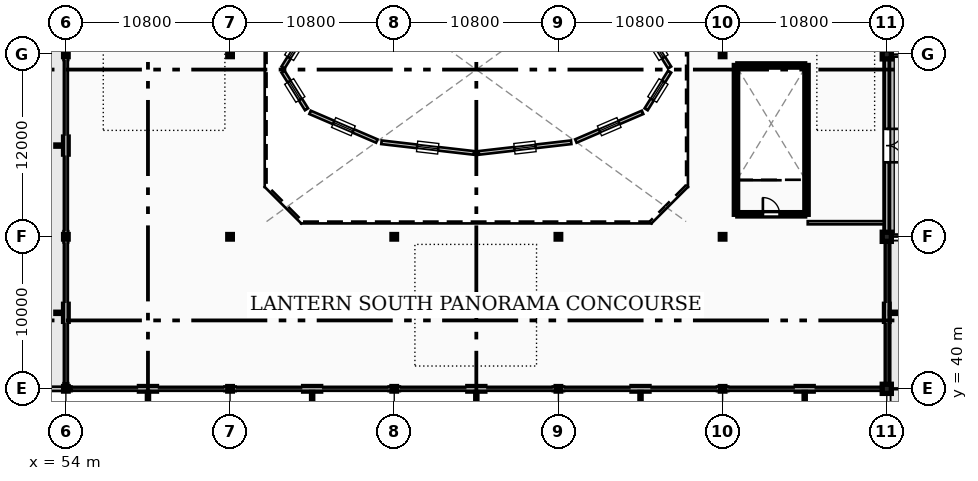
"""IFC4 building model, lengths in metres.
Left out: names, types, materials, properties, quantities, classifications, styles, units other than length and angle.
Written with IfcOpenShell. Run it as: python <this file> out.ifc"""

import sys

from ifc_helpers import new_model, si_unit, direction, frame, frame_2d, origin, origin_2d, place, context, subcontext, project, spatial, polyline, rectangle, hollow_rectangle, outline, extrude, element, fill, save


model = new_model("IFC4")
c1 = context("Model", 3, precision=1e-05, world=origin(), true_north=direction((0.0, 1.0)))
c2 = subcontext(c1, "Body", "Model", "MODEL_VIEW")
j1 = project(units=[si_unit("LENGTHUNIT", "METRE"), si_unit("PLANEANGLEUNIT", "RADIAN")], contexts=[c1])
p1 = place(None, origin())
s1 = spatial("IfcSite", under=j1, at=p1, CompositionType="ELEMENT")
p2 = place(p1, origin())
s2 = spatial("IfcBuilding", under=s1, at=p2, CompositionType="ELEMENT")
p3 = place(p2, frame((0.0, 0.0, 24.0)))
s3 = spatial("IfcBuildingStorey", under=s2, at=p3, CompositionType="ELEMENT", Elevation=24.0)
for number, where, z_axis, x_axis in (
    (1, (54.0, 40.0, 0.0), (0.0, 0.0, 1.0), (1.0, 0.0, 0.0)),
    (2, (54.0, 50.0, 0.0), (0.0, 0.0, 1.0), (1.0, 0.0, 0.0)),
    (3, (54.0, 62.0, 0.0), (0.0, 0.0, 1.0), (1.0, 0.0, 0.0)),
    (4, (64.8, 40.0, 0.0), (0.0, 0.0, 1.0), (1.0, 0.0, 0.0)),
    (5, (64.8, 50.0, 0.0), (0.0, 0.0, 1.0), (1.0, 0.0, 0.0)),
    (6, (64.8, 62.0, 0.0), (0.0, 0.0, 1.0), (1.0, 0.0, 0.0)),
    (7, (75.6, 40.0, 0.0), (0.0, 0.0, 1.0), (1.0, 0.0, 0.0)),
    (8, (75.6, 50.0, 0.0), (0.0, 0.0, 1.0), (1.0, 0.0, 0.0)),
    (9, (86.4, 40.0, 0.0), (0.0, 0.0, 1.0), (1.0, 0.0, 0.0)),
    (10, (86.4, 50.0, 0.0), (0.0, 0.0, 1.0), (1.0, 0.0, 0.0)),
    (11, (97.2, 40.0, 0.0), (0.0, 0.0, 1.0), (1.0, 0.0, 0.0)),
    (12, (97.2, 50.0, 0.0), (0.0, 0.0, 1.0), (1.0, 0.0, 0.0)),
    (13, (97.2, 62.0, 0.0), (0.0, 0.0, 1.0), (1.0, 0.0, 0.0)),
):
    element("IfcColumn", number, at=place(p3, frame(where, z_axis=z_axis, x_axis=x_axis)), inside=s3, PredefinedType="COLUMN", context=c2, shape_type="SweptSolid", body=[
        extrude(hollow_rectangle(XDim=0.3, YDim=0.3, WallThickness=0.016, InnerFilletRadius=0.016, OuterFilletRadius=0.032, at=origin_2d()), origin(), (0.0, 0.0, 1.0), 4.8),
    ])
for number, where, z_axis, x_axis in (
    (14, (108.0, 40.0, 0.0), (0.0, 0.0, 1.0), (1.0, 0.0, 0.0)),
    (15, (108.0, 50.0, 0.0), (0.0, 0.0, 1.0), (1.0, 0.0, 0.0)),
    (16, (108.0, 62.0, 0.0), (0.0, 0.0, 1.0), (1.0, 0.0, 0.0)),
):
    element("IfcColumn", number, at=place(p3, frame(where, z_axis=z_axis, x_axis=x_axis)), inside=s3, PredefinedType="COLUMN", context=c2, shape_type="SweptSolid", body=[
        extrude(rectangle(XDim=0.6, YDim=0.6, at=origin_2d()), origin(), (0.0, 0.0, 1.0), 4.8),
    ])
p4 = place(p3, frame((54.0, 56.65, 0.0), z_axis=(0.0, 0.0, 1.0), x_axis=(0.0, -1.0, 0.0)))
e17 = element("IfcWall", 17, at=p4, inside=s3, PredefinedType="STANDARD", context=c2, shape_type="SweptSolid", body=[
    extrude(rectangle(XDim=1.3, YDim=0.48, at=frame_2d((0.65, 0.0))), origin(), (0.0, 0.0, 1.0), 4.109),
])
for number, where, z_axis, x_axis in (
    (18, (54.0, 61.855, 0.0), (0.0, 0.0, 1.0), (0.0, -1.0, 0.0)),
    (19, (54.0, 50.37, 0.0), (0.0, 0.0, 1.0), (0.0, -1.0, 0.0)),
):
    element("IfcWall", number, at=place(p3, frame(where, z_axis=z_axis, x_axis=x_axis)), inside=s3, PredefinedType="STANDARD", context=c2, shape_type="SweptSolid", body=[
        extrude(rectangle(XDim=0.225, YDim=0.3, at=frame_2d((0.113, 0.0))), origin(), (0.0, 0.0, 1.0), 4.56),
    ])
p5 = place(p3, frame((54.0, 45.65, 0.0), z_axis=(0.0, 0.0, 1.0), x_axis=(0.0, -1.0, 0.0)))
e20 = element("IfcWall", 20, at=p5, inside=s3, PredefinedType="STANDARD", context=c2, shape_type="SweptSolid", body=[
    extrude(rectangle(XDim=1.3, YDim=0.48, at=frame_2d((0.65, 0.0))), origin(), (0.0, 0.0, 1.0), 4.109),
])
for number, where, z_axis, x_axis in (
    (21, (54.0, 49.855, 0.0), (0.0, 0.0, 1.0), (0.0, -1.0, 0.0)),
    (22, (54.0, 40.37, 0.0), (0.0, 0.0, 1.0), (0.0, -1.0, 0.0)),
):
    element("IfcWall", number, at=place(p3, frame(where, z_axis=z_axis, x_axis=x_axis)), inside=s3, PredefinedType="STANDARD", context=c2, shape_type="SweptSolid", body=[
        extrude(rectangle(XDim=0.225, YDim=0.3, at=frame_2d((0.113, 0.0))), origin(), (0.0, 0.0, 1.0), 4.56),
    ])
p6 = place(p3, frame((58.75, 40.0, 0.0), z_axis=(0.0, 0.0, 1.0), x_axis=(1.0, 0.0, 0.0)))
e23 = element("IfcWall", 23, at=p6, inside=s3, PredefinedType="STANDARD", context=c2, shape_type="SweptSolid", body=[
    extrude(rectangle(XDim=1.3, YDim=0.48, at=frame_2d((0.65, 0.0))), origin(), (0.0, 0.0, 1.0), 4.109),
])
for number, where, z_axis, x_axis in (
    (24, (54.145, 40.0, 0.0), (0.0, 0.0, 1.0), (1.0, 0.0, 0.0)),
    (25, (64.43, 40.0, 0.0), (0.0, 0.0, 1.0), (1.0, 0.0, 0.0)),
):
    element("IfcWall", number, at=place(p3, frame(where, z_axis=z_axis, x_axis=x_axis)), inside=s3, PredefinedType="STANDARD", context=c2, shape_type="SweptSolid", body=[
        extrude(rectangle(XDim=0.225, YDim=0.3, at=frame_2d((0.113, 0.0))), origin(), (0.0, 0.0, 1.0), 4.56),
    ])
p7 = place(p3, frame((69.55, 40.0, 0.0), z_axis=(0.0, 0.0, 1.0), x_axis=(1.0, 0.0, 0.0)))
e26 = element("IfcWall", 26, at=p7, inside=s3, PredefinedType="STANDARD", context=c2, shape_type="SweptSolid", body=[
    extrude(rectangle(XDim=1.3, YDim=0.48, at=frame_2d((0.65, 0.0))), origin(), (0.0, 0.0, 1.0), 4.109),
])
p8 = place(p3, frame((64.945, 40.0, 0.0), z_axis=(0.0, 0.0, 1.0), x_axis=(1.0, 0.0, 0.0)))
e27 = element("IfcWall", 27, at=p8, inside=s3, PredefinedType="STANDARD", context=c2, shape_type="SweptSolid", body=[
    extrude(rectangle(XDim=0.225, YDim=0.3, at=frame_2d((0.112, 0.0))), origin(), (0.0, 0.0, 1.0), 4.56),
])
p9 = place(p3, frame((75.23, 40.0, 0.0), z_axis=(0.0, 0.0, 1.0), x_axis=(1.0, 0.0, 0.0)))
e28 = element("IfcWall", 28, at=p9, inside=s3, PredefinedType="STANDARD", context=c2, shape_type="SweptSolid", body=[
    extrude(rectangle(XDim=0.225, YDim=0.3, at=frame_2d((0.113, 0.0))), origin(), (0.0, 0.0, 1.0), 4.56),
])
p10 = place(p3, frame((80.35, 40.0, 0.0), z_axis=(0.0, 0.0, 1.0), x_axis=(1.0, 0.0, 0.0)))
e29 = element("IfcWall", 29, at=p10, inside=s3, PredefinedType="STANDARD", context=c2, shape_type="SweptSolid", body=[
    extrude(rectangle(XDim=1.3, YDim=0.48, at=frame_2d((0.65, 0.0))), origin(), (0.0, 0.0, 1.0), 4.109),
])
for number, where, z_axis, x_axis in (
    (30, (75.745, 40.0, 0.0), (0.0, 0.0, 1.0), (1.0, 0.0, 0.0)),
    (31, (86.03, 40.0, 0.0), (0.0, 0.0, 1.0), (1.0, 0.0, 0.0)),
):
    element("IfcWall", number, at=place(p3, frame(where, z_axis=z_axis, x_axis=x_axis)), inside=s3, PredefinedType="STANDARD", context=c2, shape_type="SweptSolid", body=[
        extrude(rectangle(XDim=0.225, YDim=0.3, at=frame_2d((0.112, 0.0))), origin(), (0.0, 0.0, 1.0), 4.56),
    ])
p11 = place(p3, frame((91.15, 40.0, 0.0), z_axis=(0.0, 0.0, 1.0), x_axis=(1.0, 0.0, 0.0)))
e32 = element("IfcWall", 32, at=p11, inside=s3, PredefinedType="STANDARD", context=c2, shape_type="SweptSolid", body=[
    extrude(rectangle(XDim=1.3, YDim=0.48, at=frame_2d((0.65, 0.0))), origin(), (0.0, 0.0, 1.0), 4.109),
])
p12 = place(p3, frame((86.545, 40.0, 0.0), z_axis=(0.0, 0.0, 1.0), x_axis=(1.0, 0.0, 0.0)))
e33 = element("IfcWall", 33, at=p12, inside=s3, PredefinedType="STANDARD", context=c2, shape_type="SweptSolid", body=[
    extrude(rectangle(XDim=0.225, YDim=0.3, at=frame_2d((0.113, 0.0))), origin(), (0.0, 0.0, 1.0), 4.56),
])
p13 = place(p3, frame((96.83, 40.0, 0.0), z_axis=(0.0, 0.0, 1.0), x_axis=(1.0, 0.0, 0.0)))
e34 = element("IfcWall", 34, at=p13, inside=s3, PredefinedType="STANDARD", context=c2, shape_type="SweptSolid", body=[
    extrude(rectangle(XDim=0.225, YDim=0.3, at=frame_2d((0.112, 0.0))), origin(), (0.0, 0.0, 1.0), 4.56),
])
p14 = place(p3, frame((101.95, 40.0, 0.0), z_axis=(0.0, 0.0, 1.0), x_axis=(1.0, 0.0, 0.0)))
e35 = element("IfcWall", 35, at=p14, inside=s3, PredefinedType="STANDARD", context=c2, shape_type="SweptSolid", body=[
    extrude(rectangle(XDim=1.3, YDim=0.48, at=frame_2d((0.65, 0.0))), origin(), (0.0, 0.0, 1.0), 4.109),
])
for number, where, z_axis, x_axis in (
    (36, (97.345, 40.0, 0.0), (0.0, 0.0, 1.0), (1.0, 0.0, 0.0)),
    (37, (107.63, 40.0, 0.0), (0.0, 0.0, 1.0), (1.0, 0.0, 0.0)),
):
    element("IfcWall", number, at=place(p3, frame(where, z_axis=z_axis, x_axis=x_axis)), inside=s3, PredefinedType="STANDARD", context=c2, shape_type="SweptSolid", body=[
        extrude(rectangle(XDim=0.225, YDim=0.3, at=frame_2d((0.113, 0.0))), origin(), (0.0, 0.0, 1.0), 4.56),
    ])
p15 = place(p3, frame((108.0, 44.35, 0.0), z_axis=(0.0, 0.0, 1.0), x_axis=(0.0, 1.0, 0.0)))
e38 = element("IfcWall", 38, at=p15, inside=s3, PredefinedType="STANDARD", context=c2, shape_type="SweptSolid", body=[
    extrude(rectangle(XDim=1.3, YDim=0.48, at=frame_2d((0.65, 0.0))), origin(), (0.0, 0.0, 1.0), 4.109),
])
for number, where, z_axis, x_axis in (
    (39, (108.0, 40.145, 0.0), (0.0, 0.0, 1.0), (0.0, 1.0, 0.0)),
    (40, (108.0, 49.63, 0.0), (0.0, 0.0, 1.0), (0.0, 1.0, 0.0)),
):
    element("IfcWall", number, at=place(p3, frame(where, z_axis=z_axis, x_axis=x_axis)), inside=s3, PredefinedType="STANDARD", context=c2, shape_type="SweptSolid", body=[
        extrude(rectangle(XDim=0.225, YDim=0.3, at=frame_2d((0.113, 0.0))), origin(), (0.0, 0.0, 1.0), 4.56),
    ])
p16 = place(p3, frame((108.0, 50.145, 0.0), z_axis=(0.0, 0.0, 1.0), x_axis=(0.0, 1.0, 0.0)))
e41 = element("IfcWall", 41, at=p16, inside=s3, PredefinedType="STANDARD", context=c2, shape_type="SweptSolid", body=[
    extrude(rectangle(XDim=11.71, YDim=0.42, at=frame_2d((5.855, 0.0))), origin(), (0.0, 0.0, 1.0), 4.109),
])
p17 = place(p16, frame((4.755, 0.0, 0.0)))
e42 = element("IfcOpeningElement", 42, at=p17, cuts=e41, PredefinedType="OPENING", context=c2, shape_type="SweptSolid", body=[
    extrude(rectangle(XDim=2.2, YDim=2.4, at=frame_2d((1.1, 1.2))), frame((0.0, 0.22, 0.0), z_axis=(0.0, -1.0, 0.0), x_axis=(1.0, 0.0, 0.0)), (0.0, 0.0, 1.0), 0.44),
])
p18 = place(p3, frame((54.35, 40.0, 4.6), z_axis=(0.0, 0.0, 1.0), x_axis=(1.0, 0.0, 0.0)))
e43 = element("IfcWall", 43, at=p18, inside=s3, PredefinedType="PARAPET", context=c2, shape_type="SweptSolid", body=[
    extrude(rectangle(XDim=53.3, YDim=0.26, at=frame_2d((26.65, 0.0))), origin(), (0.0, 0.0, 1.0), 0.55),
])
for number, where, z_axis, x_axis in (
    (44, (54.0, 40.35, 4.6), (0.0, 0.0, 1.0), (0.0, 1.0, 0.0)),
    (45, (108.0, 40.35, 4.6), (0.0, 0.0, 1.0), (0.0, 1.0, 0.0)),
):
    element("IfcWall", number, at=place(p3, frame(where, z_axis=z_axis, x_axis=x_axis)), inside=s3, PredefinedType="PARAPET", context=c2, shape_type="SweptSolid", body=[
        extrude(rectangle(XDim=41.3, YDim=0.26, at=frame_2d((20.65, 0.0))), origin(), (0.0, 0.0, 1.0), 0.55),
    ])
p19 = place(p3, frame((93.715, 61.136, 7.84), z_axis=(0.0, 0.0, 1.0), x_axis=(-0.52909704263, 0.848561323347, 0.0)))
e46 = element("IfcWall", 46, at=p19, inside=s3, PredefinedType="STANDARD", context=c2, shape_type="SweptSolid", body=[
    extrude(rectangle(XDim=2.921, YDim=0.24, at=frame_2d((1.46, 0.0))), origin(), (0.0, 0.0, 1.0), 2.16),
])
p20 = place(p19, frame((0.76, 0.0, 0.3)))
e47 = element("IfcOpeningElement", 47, at=p20, cuts=e46, PredefinedType="OPENING", context=c2, shape_type="SweptSolid", body=[
    extrude(rectangle(XDim=1.4, YDim=1.4, at=frame_2d((0.7, 0.7))), frame((0.0, 0.13, 0.0), z_axis=(0.0, -1.0, 0.0), x_axis=(1.0, 0.0, 0.0)), (0.0, 0.0, 1.0), 0.26),
])
p21 = place(p3, frame((69.83, 63.614, 7.84), z_axis=(0.0, 0.0, 1.0), x_axis=(-0.52909704263, -0.848561323347, 0.0)))
e48 = element("IfcWall", 48, at=p21, inside=s3, PredefinedType="STANDARD", context=c2, shape_type="SweptSolid", body=[
    extrude(rectangle(XDim=2.921, YDim=0.24, at=frame_2d((1.46, 0.0))), origin(), (0.0, 0.0, 1.0), 2.16),
])
p22 = place(p21, frame((0.76, 0.0, 0.3)))
e49 = element("IfcOpeningElement", 49, at=p22, cuts=e48, PredefinedType="OPENING", context=c2, shape_type="SweptSolid", body=[
    extrude(rectangle(XDim=1.4, YDim=1.4, at=frame_2d((0.7, 0.7))), frame((0.0, 0.13, 0.0), z_axis=(0.0, -1.0, 0.0), x_axis=(1.0, 0.0, 0.0)), (0.0, 0.0, 1.0), 0.26),
])
p23 = place(p3, frame((68.285, 60.864, 7.84), z_axis=(0.0, 0.0, 1.0), x_axis=(0.52909704263, -0.848561323347, 0.0)))
e50 = element("IfcWall", 50, at=p23, inside=s3, PredefinedType="STANDARD", context=c2, shape_type="SweptSolid", body=[
    extrude(rectangle(XDim=2.921, YDim=0.24, at=frame_2d((1.46, 0.0))), origin(), (0.0, 0.0, 1.0), 2.16),
])
p24 = place(p23, frame((0.76, 0.0, 0.3)))
e51 = element("IfcOpeningElement", 51, at=p24, cuts=e50, PredefinedType="OPENING", context=c2, shape_type="SweptSolid", body=[
    extrude(rectangle(XDim=1.4, YDim=1.4, at=frame_2d((0.7, 0.7))), frame((0.0, 0.13, 0.0), z_axis=(0.0, -1.0, 0.0), x_axis=(1.0, 0.0, 0.0)), (0.0, 0.0, 1.0), 0.26),
])
p25 = place(p3, frame((70.062, 58.187, 7.84), z_axis=(0.0, 0.0, 1.0), x_axis=(0.918772047343, -0.394788456039, 0.0)))
e52 = element("IfcWall", 52, at=p25, inside=s3, PredefinedType="STANDARD", context=c2, shape_type="SweptSolid", body=[
    extrude(rectangle(XDim=4.779, YDim=0.24, at=frame_2d((2.39, 0.0))), origin(), (0.0, 0.0, 1.0), 2.16),
])
p26 = place(p25, frame((1.69, 0.0, 0.3)))
e53 = element("IfcOpeningElement", 53, at=p26, cuts=e52, PredefinedType="OPENING", context=c2, shape_type="SweptSolid", body=[
    extrude(rectangle(XDim=1.4, YDim=1.4, at=frame_2d((0.7, 0.7))), frame((0.0, 0.13, 0.0), z_axis=(0.0, -1.0, 0.0), x_axis=(1.0, 0.0, 0.0)), (0.0, 0.0, 1.0), 0.26),
])
p27 = place(p3, frame((74.759, 56.219, 7.84), z_axis=(0.0, 0.0, 1.0), x_axis=(0.993438765736, -0.114365286402, 0.0)))
e54 = element("IfcWall", 54, at=p27, inside=s3, PredefinedType="STANDARD", context=c2, shape_type="SweptSolid", body=[
    extrude(rectangle(XDim=6.123, YDim=0.24, at=frame_2d((3.061, 0.0))), origin(), (0.0, 0.0, 1.0), 2.16),
])
p28 = place(p27, frame((2.361, 0.0, 0.3)))
e55 = element("IfcOpeningElement", 55, at=p28, cuts=e54, PredefinedType="OPENING", context=c2, shape_type="SweptSolid", body=[
    extrude(rectangle(XDim=1.4, YDim=1.4, at=frame_2d((0.7, 0.7))), frame((0.0, 0.13, 0.0), z_axis=(0.0, -1.0, 0.0), x_axis=(1.0, 0.0, 0.0)), (0.0, 0.0, 1.0), 0.26),
])
p29 = place(p3, frame((81.159, 55.518, 7.84), z_axis=(0.0, 0.0, 1.0), x_axis=(0.993438765736, 0.114365286402, 0.0)))
e56 = element("IfcWall", 56, at=p29, inside=s3, PredefinedType="STANDARD", context=c2, shape_type="SweptSolid", body=[
    extrude(rectangle(XDim=6.123, YDim=0.24, at=frame_2d((3.061, 0.0))), origin(), (0.0, 0.0, 1.0), 2.16),
])
p30 = place(p29, frame((2.361, 0.0, 0.3)))
e57 = element("IfcOpeningElement", 57, at=p30, cuts=e56, PredefinedType="OPENING", context=c2, shape_type="SweptSolid", body=[
    extrude(rectangle(XDim=1.4, YDim=1.4, at=frame_2d((0.7, 0.7))), frame((0.0, 0.13, 0.0), z_axis=(0.0, -1.0, 0.0), x_axis=(1.0, 0.0, 0.0)), (0.0, 0.0, 1.0), 0.26),
])
p31 = place(p3, frame((87.547, 56.3, 7.84), z_axis=(0.0, 0.0, 1.0), x_axis=(0.918772047343, 0.394788456039, 0.0)))
e58 = element("IfcWall", 58, at=p31, inside=s3, PredefinedType="STANDARD", context=c2, shape_type="SweptSolid", body=[
    extrude(rectangle(XDim=4.779, YDim=0.24, at=frame_2d((2.39, 0.0))), origin(), (0.0, 0.0, 1.0), 2.16),
])
p32 = place(p31, frame((1.69, 0.0, 0.3)))
e59 = element("IfcOpeningElement", 59, at=p32, cuts=e58, PredefinedType="OPENING", context=c2, shape_type="SweptSolid", body=[
    extrude(rectangle(XDim=1.4, YDim=1.4, at=frame_2d((0.7, 0.7))), frame((0.0, 0.13, 0.0), z_axis=(0.0, -1.0, 0.0), x_axis=(1.0, 0.0, 0.0)), (0.0, 0.0, 1.0), 0.26),
])
p33 = place(p3, frame((92.17, 58.386, 7.84), z_axis=(0.0, 0.0, 1.0), x_axis=(0.52909704263, 0.848561323347, 0.0)))
e60 = element("IfcWall", 60, at=p33, inside=s3, PredefinedType="STANDARD", context=c2, shape_type="SweptSolid", body=[
    extrude(rectangle(XDim=2.921, YDim=0.24, at=frame_2d((1.46, 0.0))), origin(), (0.0, 0.0, 1.0), 2.16),
])
p34 = place(p33, frame((0.76, 0.0, 0.3)))
e61 = element("IfcOpeningElement", 61, at=p34, cuts=e60, PredefinedType="OPENING", context=c2, shape_type="SweptSolid", body=[
    extrude(rectangle(XDim=1.4, YDim=1.4, at=frame_2d((0.7, 0.7))), frame((0.0, 0.13, 0.0), z_axis=(0.0, -1.0, 0.0), x_axis=(1.0, 0.0, 0.0)), (0.0, 0.0, 1.0), 0.26),
])
p35 = place(p3, frame((3.4, 40.0, -0.02), z_axis=(0.0, 0.0, 1.0), x_axis=(1.0, 0.0, 0.0)))
e62 = element("IfcWall", 62, at=p35, inside=s3, PredefinedType="STANDARD", context=c2, shape_type="SweptSolid", body=[
    extrude(outline(polyline([(0.0, 0.0), (50.45, 0.0), (50.45, 1.48), (0.0, 0.04), (0.0, 0.0)])), frame((0.0, 0.14, 0.0), z_axis=(0.0, -1.0, 0.0), x_axis=(1.0, 0.0, 0.0)), (0.0, 0.0, 1.0), 0.28),
])
for number, where, z_axis, x_axis in (
    (63, (98.08, 51.48, 0.0), (0.0, 0.0, 1.0), (0.0, 1.0, 0.0)),
    (64, (102.72, 51.48, 0.0), (0.0, 0.0, 1.0), (0.0, 1.0, 0.0)),
):
    element("IfcWall", number, at=place(p3, frame(where, z_axis=z_axis, x_axis=x_axis)), inside=s3, PredefinedType="SHEAR", context=c2, shape_type="SweptSolid", body=[
        extrude(rectangle(XDim=9.79, YDim=0.22, at=frame_2d((4.895, 0.0))), origin(), (0.0, 0.0, 1.0), 4.56),
    ])
p36 = place(p3, frame((98.2, 61.27, 0.0), z_axis=(0.0, 0.0, 1.0), x_axis=(1.0, 0.0, 0.0)))
e65 = element("IfcWall", 65, at=p36, inside=s3, PredefinedType="SHEAR", context=c2, shape_type="SweptSolid", body=[
    extrude(rectangle(XDim=4.4, YDim=0.22, at=frame_2d((2.2, 0.0))), origin(), (0.0, 0.0, 1.0), 4.56),
])
p37 = place(p3, frame((98.2, 51.48, 0.0), z_axis=(0.0, 0.0, 1.0), x_axis=(1.0, 0.0, 0.0)))
e66 = element("IfcWall", 66, at=p37, inside=s3, PredefinedType="SHEAR", context=c2, shape_type="SweptSolid", body=[
    extrude(rectangle(XDim=4.4, YDim=0.22, at=frame_2d((2.2, 0.0))), origin(), (0.0, 0.0, 1.0), 4.56),
])
p38 = place(p37, frame((1.65, 0.0, 0.0)))
e67 = element("IfcOpeningElement", 67, at=p38, cuts=e66, PredefinedType="OPENING", context=c2, shape_type="SweptSolid", body=[
    extrude(rectangle(XDim=1.1, YDim=2.2, at=frame_2d((0.55, 1.1))), frame((0.0, 0.12, 0.0), z_axis=(0.0, -1.0, 0.0), x_axis=(1.0, 0.0, 0.0)), (0.0, 0.0, 1.0), 0.24),
])
p39 = place(p3, frame((102.8, 50.925, 0.0), z_axis=(0.0, 0.0, 1.0), x_axis=(1.0, 0.0, 0.0)))
e68 = element("IfcWall", 68, at=p39, inside=s3, PredefinedType="PARTITIONING", context=c2, shape_type="SweptSolid", body=[
    extrude(rectangle(XDim=5.02, YDim=0.21, at=frame_2d((2.51, 0.0))), origin(), (0.0, 0.0, 1.0), 4.52),
])
p40 = place(p17, frame((2.2, 0.0, 0.0), z_axis=(0.0, 0.0, 1.0), x_axis=(-1.0, 0.0, 0.0)))
e69 = element("IfcDoor", 69, at=p40, inside=s3, OperationType="DOUBLE_DOOR_SINGLE_SWING", PredefinedType="DOOR", context=c2, shape_type="SweptSolid", body=[
    extrude(rectangle(XDim=2.2, YDim=2.4, at=frame_2d((1.1, 1.2))), frame((0.0, 0.025, 0.0), z_axis=(0.0, -1.0, 0.0), x_axis=(1.0, 0.0, 0.0)), (0.0, 0.0, 1.0), 0.05),
])
fill(e42, e69)
p41 = place(p20, origin())
e70 = element("IfcWindow", 70, at=p41, inside=s3, PartitioningType="SINGLE_PANEL", PredefinedType="WINDOW", context=c2, shape_type="SweptSolid", body=[
    extrude(rectangle(XDim=1.4, YDim=1.4, at=frame_2d((0.7, 0.7))), frame((0.0, 0.03, 0.0), z_axis=(0.0, -1.0, 0.0), x_axis=(1.0, 0.0, 0.0)), (0.0, 0.0, 1.0), 0.06),
])
fill(e47, e70)
p42 = place(p22, origin())
e71 = element("IfcWindow", 71, at=p42, inside=s3, PartitioningType="SINGLE_PANEL", PredefinedType="WINDOW", context=c2, shape_type="SweptSolid", body=[
    extrude(rectangle(XDim=1.4, YDim=1.4, at=frame_2d((0.7, 0.7))), frame((0.0, 0.03, 0.0), z_axis=(0.0, -1.0, 0.0), x_axis=(1.0, 0.0, 0.0)), (0.0, 0.0, 1.0), 0.06),
])
fill(e49, e71)
p43 = place(p24, origin())
e72 = element("IfcWindow", 72, at=p43, inside=s3, PartitioningType="SINGLE_PANEL", PredefinedType="WINDOW", context=c2, shape_type="SweptSolid", body=[
    extrude(rectangle(XDim=1.4, YDim=1.4, at=frame_2d((0.7, 0.7))), frame((0.0, 0.03, 0.0), z_axis=(0.0, -1.0, 0.0), x_axis=(1.0, 0.0, 0.0)), (0.0, 0.0, 1.0), 0.06),
])
fill(e51, e72)
p44 = place(p26, origin())
e73 = element("IfcWindow", 73, at=p44, inside=s3, PartitioningType="SINGLE_PANEL", PredefinedType="WINDOW", context=c2, shape_type="SweptSolid", body=[
    extrude(rectangle(XDim=1.4, YDim=1.4, at=frame_2d((0.7, 0.7))), frame((0.0, 0.03, 0.0), z_axis=(0.0, -1.0, 0.0), x_axis=(1.0, 0.0, 0.0)), (0.0, 0.0, 1.0), 0.06),
])
fill(e53, e73)
p45 = place(p28, origin())
e74 = element("IfcWindow", 74, at=p45, inside=s3, PartitioningType="SINGLE_PANEL", PredefinedType="WINDOW", context=c2, shape_type="SweptSolid", body=[
    extrude(rectangle(XDim=1.4, YDim=1.4, at=frame_2d((0.7, 0.7))), frame((0.0, 0.03, 0.0), z_axis=(0.0, -1.0, 0.0), x_axis=(1.0, 0.0, 0.0)), (0.0, 0.0, 1.0), 0.06),
])
fill(e55, e74)
p46 = place(p30, origin())
e75 = element("IfcWindow", 75, at=p46, inside=s3, PartitioningType="SINGLE_PANEL", PredefinedType="WINDOW", context=c2, shape_type="SweptSolid", body=[
    extrude(rectangle(XDim=1.4, YDim=1.4, at=frame_2d((0.7, 0.7))), frame((0.0, 0.03, 0.0), z_axis=(0.0, -1.0, 0.0), x_axis=(1.0, 0.0, 0.0)), (0.0, 0.0, 1.0), 0.06),
])
fill(e57, e75)
p47 = place(p32, origin())
e76 = element("IfcWindow", 76, at=p47, inside=s3, PartitioningType="SINGLE_PANEL", PredefinedType="WINDOW", context=c2, shape_type="SweptSolid", body=[
    extrude(rectangle(XDim=1.4, YDim=1.4, at=frame_2d((0.7, 0.7))), frame((0.0, 0.03, 0.0), z_axis=(0.0, -1.0, 0.0), x_axis=(1.0, 0.0, 0.0)), (0.0, 0.0, 1.0), 0.06),
])
fill(e59, e76)
p48 = place(p34, origin())
e77 = element("IfcWindow", 77, at=p48, inside=s3, PartitioningType="SINGLE_PANEL", PredefinedType="WINDOW", context=c2, shape_type="SweptSolid", body=[
    extrude(rectangle(XDim=1.4, YDim=1.4, at=frame_2d((0.7, 0.7))), frame((0.0, 0.03, 0.0), z_axis=(0.0, -1.0, 0.0), x_axis=(1.0, 0.0, 0.0)), (0.0, 0.0, 1.0), 0.06),
])
fill(e61, e77)
p49 = place(p38, origin())
e78 = element("IfcDoor", 78, at=p49, inside=s3, OperationType="SINGLE_SWING_LEFT", PredefinedType="DOOR", context=c2, shape_type="SweptSolid", body=[
    extrude(rectangle(XDim=1.1, YDim=2.2, at=frame_2d((0.55, 1.1))), frame((0.0, 0.025, 0.0), z_axis=(0.0, -1.0, 0.0), x_axis=(1.0, 0.0, 0.0)), (0.0, 0.0, 1.0), 0.05),
])
fill(e67, e78)
save(model, sys.argv[1])
